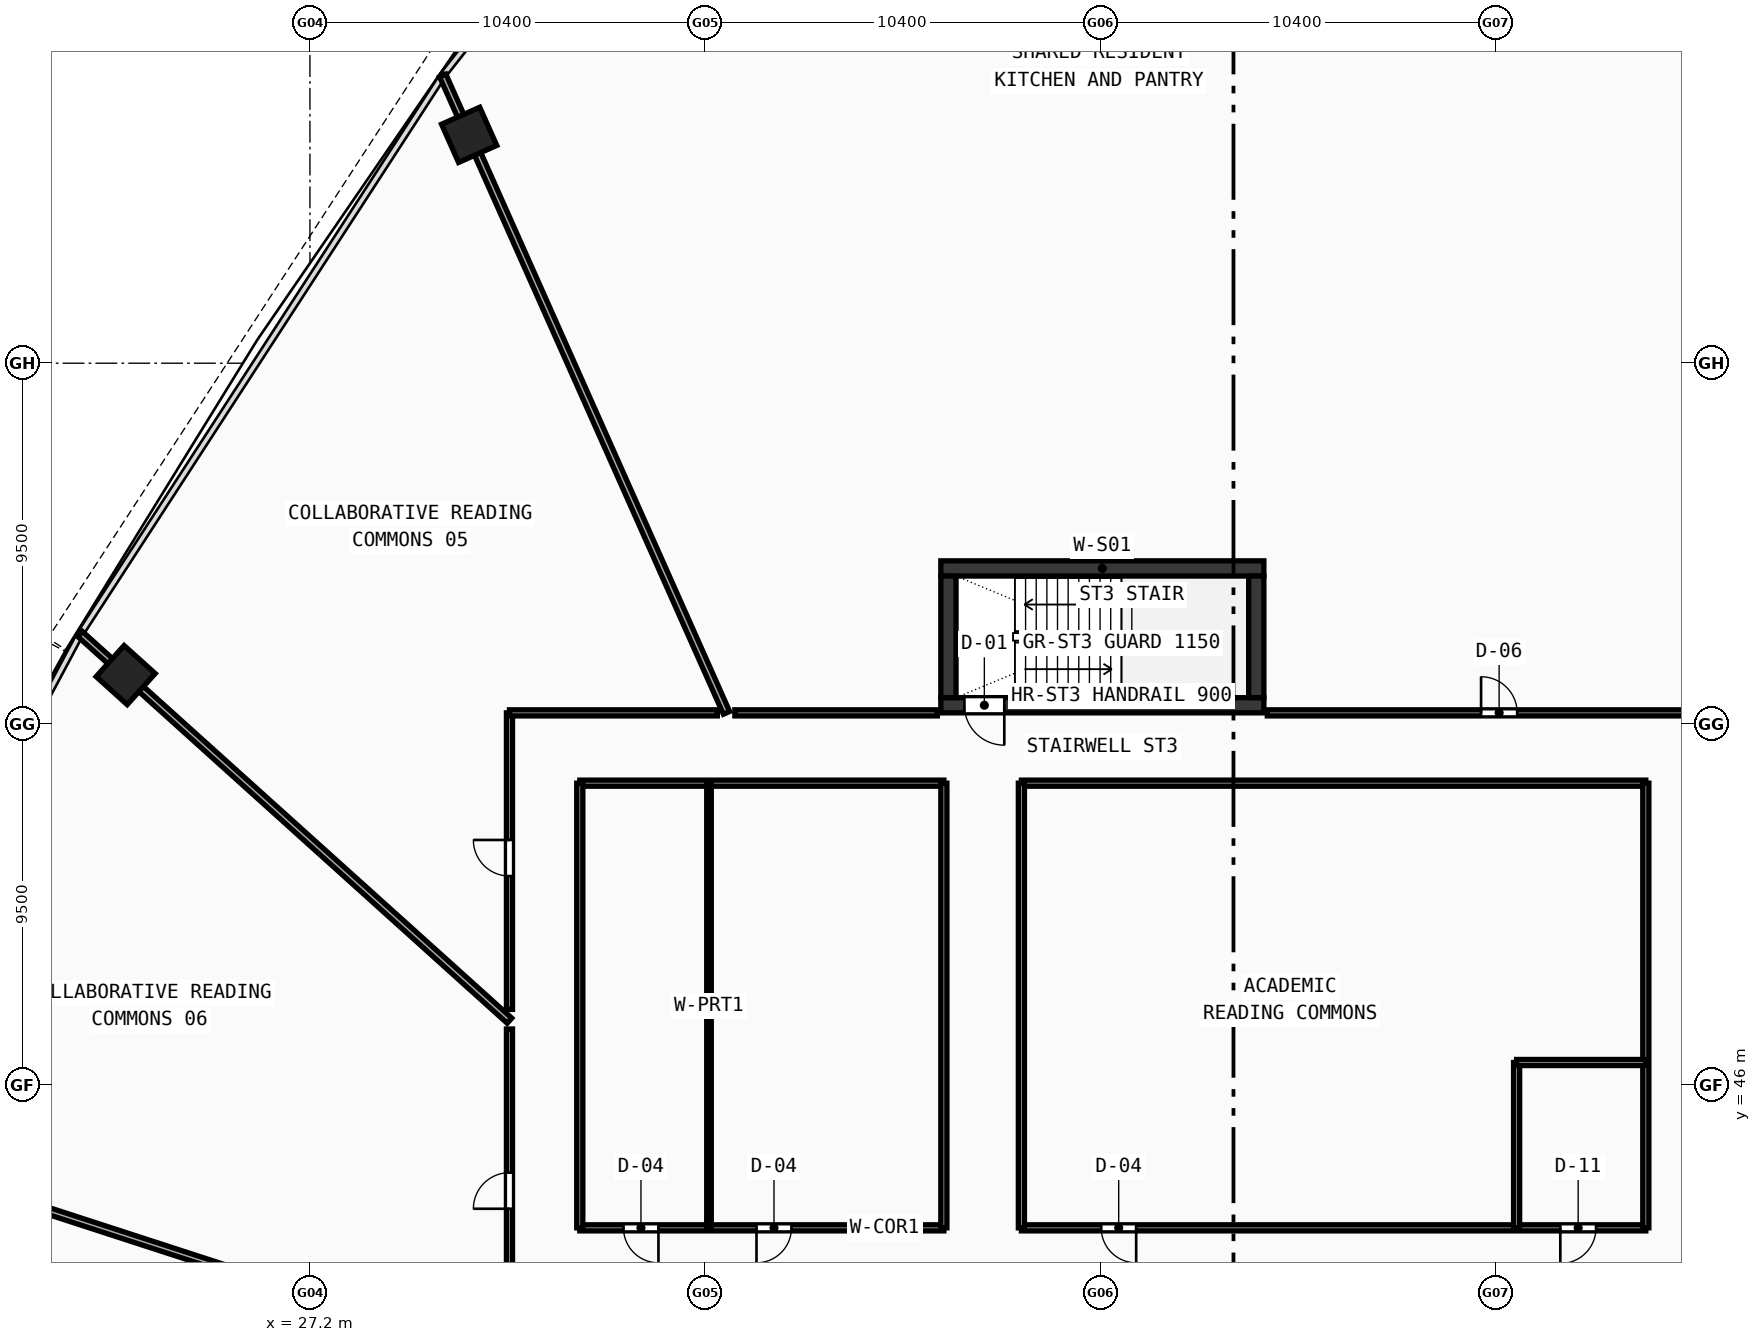
"""IFC4 building model, lengths in metres.
Left out: names, types, materials, properties, quantities, classifications, styles, units other than length and angle.
Written with IfcOpenShell. Run it as: python <this file> out.ifc"""

import sys

from ifc_helpers import new_model, si_unit, direction, frame, frame_2d, origin, origin_with_axes, origin_2d, place, context, subcontext, project, spatial, rectangle, hollow_rectangle, extrude, source, transform, mapped, element, fill, save


model = new_model("IFC4")
c1 = context("Model", 3, precision=1e-05, world=origin(), true_north=direction((0.0, 1.0)))
c2 = subcontext(c1, "Body", "Model", "MODEL_VIEW")
j1 = project(units=[si_unit("LENGTHUNIT", "METRE"), si_unit("PLANEANGLEUNIT", "RADIAN")], contexts=[c1])
p1 = place(None, origin())
s1 = spatial("IfcSite", under=j1, at=p1, CompositionType="ELEMENT")
p2 = place(p1, origin())
s2 = spatial("IfcBuilding", under=s1, at=p2, CompositionType="ELEMENT")
p3 = place(p2, frame((0.0, 0.0, 48.55)))
s3 = spatial("IfcBuildingStorey", under=s2, at=p3, CompositionType="ELEMENT", Elevation=48.55)
p4 = place(p3, frame((43.8, 59.6, 0.0), z_axis=(0.0, 0.0, 1.0), x_axis=(1.0, 0.0, 0.0)))
e1 = element("IfcWall", 1, at=p4, inside=s3, PredefinedType="SHEAR", context=c2, shape_type="SweptSolid", body=[
    extrude(rectangle(XDim=8.5, YDim=0.4, at=frame_2d((4.25, 0.0))), origin(), (0.0, 0.0, 1.0), 3.37),
])
p5 = place(p3, frame((43.8, 56.0, 0.0), z_axis=(0.0, 0.0, 1.0), x_axis=(1.0, 0.0, 0.0)))
e2 = element("IfcWall", 2, at=p5, inside=s3, PredefinedType="SHEAR", context=c2, shape_type="SweptSolid", body=[
    extrude(rectangle(XDim=8.5, YDim=0.4, at=frame_2d((4.25, 0.0))), origin(), (0.0, 0.0, 1.0), 3.37),
])
p6 = place(p5, frame((0.62, 0.0, 0.0)))
e3 = element("IfcOpeningElement", 3, at=p6, cuts=e2, PredefinedType="OPENING", context=c2, shape_type="SweptSolid", body=[
    extrude(rectangle(XDim=1.05, YDim=2.1, at=frame_2d((0.525, 1.05))), frame((0.0, 0.21, 0.0), z_axis=(0.0, -1.0, 0.0), x_axis=(1.0, 0.0, 0.0)), (0.0, 0.0, 1.0), 0.42),
])
for number, where, z_axis, x_axis in (
    (4, (44.0, 56.2, 0.0), (0.0, 0.0, 1.0), (0.0, 1.0, 0.0)),
    (5, (52.1, 56.2, 0.0), (0.0, 0.0, 1.0), (0.0, 1.0, 0.0)),
):
    element("IfcWall", number, at=place(p3, frame(where, z_axis=z_axis, x_axis=x_axis)), inside=s3, PredefinedType="SHEAR", context=c2, shape_type="SweptSolid", body=[
        extrude(rectangle(XDim=3.2, YDim=0.4, at=frame_2d((1.6, 0.0))), origin(), (0.0, 0.0, 1.0), 3.37),
    ])
m1 = source(origin(), c2, "Body", "SweptSolid", [
    extrude(hollow_rectangle(XDim=1.1, YDim=1.1, WallThickness=0.045, at=origin_2d()), origin(), (0.0, 0.0, 1.0), 3.63),
])
for number, where, z_axis, x_axis in (
    (6, (31.389, 71.009, -0.26), (0.0, 0.0, 1.0), (-0.914, -0.407, 0.0)),
    (7, (22.351, 56.794, -0.26), (0.0, 0.0, 1.0), (-0.669, -0.743, 0.0)),
):
    element("IfcColumn", number, at=place(p3, frame(where, z_axis=z_axis, x_axis=x_axis)), inside=s3, PredefinedType="COLUMN", context=c2, shape_type="MappedRepresentation", body=[
        mapped(m1, transform((0.0, 0.0, 0.0), scale=1.0)),
    ])
p7 = place(p3, frame((34.3, 42.25, 0.0), z_axis=(0.0, 0.0, 1.0), x_axis=(1.0, 0.0, 0.0)))
e8 = element("IfcWall", 8, at=p7, inside=s3, PredefinedType="PARTITIONING", context=c2, shape_type="SweptSolid", body=[
    extrude(rectangle(XDim=9.58, YDim=0.16, at=frame_2d((4.79, 0.0))), origin(), (0.0, 0.0, 1.0), 2.67),
])
p8 = place(p7, frame((1.15, 0.0, 0.0)))
e9 = element("IfcOpeningElement", 9, at=p8, cuts=e8, PredefinedType="OPENING", context=c2, shape_type="SweptSolid", body=[
    extrude(rectangle(XDim=0.92, YDim=2.1, at=frame_2d((0.46, 1.05))), frame((0.0, 0.09, 0.0), z_axis=(0.0, -1.0, 0.0), x_axis=(1.0, 0.0, 0.0)), (0.0, 0.0, 1.0), 0.18),
])
p9 = place(p7, frame((4.65, 0.0, 0.0)))
e10 = element("IfcOpeningElement", 10, at=p9, cuts=e8, PredefinedType="OPENING", context=c2, shape_type="SweptSolid", body=[
    extrude(rectangle(XDim=0.92, YDim=2.1, at=frame_2d((0.46, 1.05))), frame((0.0, 0.09, 0.0), z_axis=(0.0, -1.0, 0.0), x_axis=(1.0, 0.0, 0.0)), (0.0, 0.0, 1.0), 0.18),
])
p10 = place(p3, frame((34.3, 53.95, 0.0), z_axis=(0.0, 0.0, 1.0), x_axis=(1.0, 0.0, 0.0)))
e11 = element("IfcWall", 11, at=p10, inside=s3, PredefinedType="PARTITIONING", context=c2, shape_type="SweptSolid", body=[
    extrude(rectangle(XDim=9.58, YDim=0.16, at=frame_2d((4.79, 0.0))), origin(), (0.0, 0.0, 1.0), 2.67),
])
for number, where, z_axis, x_axis in (
    (12, (34.3, 42.25, 0.0), (0.0, 0.0, 1.0), (0.0, 1.0, 0.0)),
    (13, (43.88, 42.25, 0.0), (0.0, 0.0, 1.0), (0.0, 1.0, 0.0)),
):
    element("IfcWall", number, at=place(p3, frame(where, z_axis=z_axis, x_axis=x_axis)), inside=s3, PredefinedType="PARTITIONING", context=c2, shape_type="SweptSolid", body=[
        extrude(rectangle(XDim=11.7, YDim=0.16, at=frame_2d((5.85, 0.0))), origin(), (0.0, 0.0, 1.0), 2.67),
    ])
p11 = place(p3, frame((37.7, 42.25, 0.0), z_axis=(0.0, 0.0, 1.0), x_axis=(0.0, 1.0, 0.0)))
e14 = element("IfcWall", 14, at=p11, inside=s3, PredefinedType="PARTITIONING", context=c2, shape_type="SweptSolid", body=[
    extrude(rectangle(XDim=11.7, YDim=0.12, at=frame_2d((5.85, 0.0))), origin(), (0.0, 0.0, 1.0), 2.67),
])
p12 = place(p3, frame((45.92, 42.25, 0.0), z_axis=(0.0, 0.0, 1.0), x_axis=(1.0, 0.0, 0.0)))
e15 = element("IfcWall", 15, at=p12, inside=s3, PredefinedType="PARTITIONING", context=c2, shape_type="SweptSolid", body=[
    extrude(rectangle(XDim=16.43, YDim=0.16, at=frame_2d((8.215, 0.0))), origin(), (0.0, 0.0, 1.0), 2.67),
])
p13 = place(p12, frame((2.1, 0.0, 0.0)))
e16 = element("IfcOpeningElement", 16, at=p13, cuts=e15, PredefinedType="OPENING", context=c2, shape_type="SweptSolid", body=[
    extrude(rectangle(XDim=0.92, YDim=2.1, at=frame_2d((0.46, 1.05))), frame((0.0, 0.09, 0.0), z_axis=(0.0, -1.0, 0.0), x_axis=(1.0, 0.0, 0.0)), (0.0, 0.0, 1.0), 0.18),
])
p14 = place(p12, frame((14.18, 0.0, 0.0)))
e17 = element("IfcOpeningElement", 17, at=p14, cuts=e15, PredefinedType="OPENING", context=c2, shape_type="SweptSolid", body=[
    extrude(rectangle(XDim=0.94, YDim=2.1, at=frame_2d((0.47, 1.05))), frame((0.0, 0.09, 0.0), z_axis=(0.0, -1.0, 0.0), x_axis=(1.0, 0.0, 0.0)), (0.0, 0.0, 1.0), 0.18),
])
p15 = place(p3, frame((45.92, 53.95, 0.0), z_axis=(0.0, 0.0, 1.0), x_axis=(1.0, 0.0, 0.0)))
e18 = element("IfcWall", 18, at=p15, inside=s3, PredefinedType="PARTITIONING", context=c2, shape_type="SweptSolid", body=[
    extrude(rectangle(XDim=16.43, YDim=0.16, at=frame_2d((8.215, 0.0))), origin(), (0.0, 0.0, 1.0), 2.67),
])
p16 = place(p3, frame((45.92, 42.25, 0.0), z_axis=(0.0, 0.0, 1.0), x_axis=(0.0, 1.0, 0.0)))
e19 = element("IfcWall", 19, at=p16, inside=s3, PredefinedType="PARTITIONING", context=c2, shape_type="SweptSolid", body=[
    extrude(rectangle(XDim=11.7, YDim=0.16, at=frame_2d((5.85, 0.0))), origin(), (0.0, 0.0, 1.0), 2.97),
])
p17 = place(p3, frame((62.35, 42.25, 0.0), z_axis=(0.0, 0.0, 1.0), x_axis=(0.0, 1.0, 0.0)))
e20 = element("IfcWall", 20, at=p17, inside=s3, PredefinedType="PARTITIONING", context=c2, shape_type="SweptSolid", body=[
    extrude(rectangle(XDim=11.7, YDim=0.16, at=frame_2d((5.85, 0.0))), origin(), (0.0, 0.0, 1.0), 2.67),
])
p18 = place(p3, frame((58.95, 42.25, 0.0), z_axis=(0.0, 0.0, 1.0), x_axis=(0.0, 1.0, 0.0)))
e21 = element("IfcWall", 21, at=p18, inside=s3, PredefinedType="PARTITIONING", context=c2, shape_type="SweptSolid", body=[
    extrude(rectangle(XDim=4.35, YDim=0.16, at=frame_2d((2.175, 0.0))), origin(), (0.0, 0.0, 1.0), 2.67),
])
p19 = place(p3, frame((58.95, 46.6, 0.0), z_axis=(0.0, 0.0, 1.0), x_axis=(1.0, 0.0, 0.0)))
e22 = element("IfcWall", 22, at=p19, inside=s3, PredefinedType="PARTITIONING", context=c2, shape_type="SweptSolid", body=[
    extrude(rectangle(XDim=3.4, YDim=0.16, at=frame_2d((1.7, 0.0))), origin(), (0.0, 0.0, 1.0), 2.67),
])
p20 = place(p3, frame((38.16, 55.8, 0.0), z_axis=(0.0, 0.0, 1.0), x_axis=(-0.406730734994, 0.913548088067, 0.0)))
e23 = element("IfcWall", 23, at=p20, inside=s3, PredefinedType="PARTITIONING", context=c2, shape_type="SweptSolid", body=[
    extrude(rectangle(XDim=18.356, YDim=0.18, at=frame_2d((9.178, 0.0))), origin(), (0.0, 0.0, 1.0), 2.67),
])
p21 = place(p3, frame((32.45, 47.701, 0.0), z_axis=(0.0, 0.0, 1.0), x_axis=(-0.743155181141, 0.66911910505, 0.0)))
e24 = element("IfcWall", 24, at=p21, inside=s3, PredefinedType="PARTITIONING", context=c2, shape_type="SweptSolid", body=[
    extrude(rectangle(XDim=15.202, YDim=0.18, at=frame_2d((7.601, 0.0))), origin(), (0.0, 0.0, 1.0), 2.67),
])
p22 = place(p3, frame((32.45, 38.752, 0.0), z_axis=(0.0, 0.0, 1.0), x_axis=(-0.951055021268, 0.309021595557, 0.0)))
e25 = element("IfcWall", 25, at=p22, inside=s3, PredefinedType="PARTITIONING", context=c2, shape_type="SweptSolid", body=[
    extrude(rectangle(XDim=19.264, YDim=0.18, at=frame_2d((9.632, 0.0))), origin(), (0.0, 0.0, 1.0), 2.67),
])
p23 = place(p3, frame((32.45, 38.984, 0.0), z_axis=(0.0, 0.0, 1.0), x_axis=(0.0, 1.0, 0.0)))
e26 = element("IfcWall", 26, at=p23, inside=s3, PredefinedType="PARTITIONING", context=c2, shape_type="SweptSolid", body=[
    extrude(rectangle(XDim=8.498, YDim=0.16, at=frame_2d((4.249, 0.0))), origin(), (0.0, 0.0, 1.0), 2.67),
])
p24 = place(p23, frame((3.768, 0.0, 0.0)))
e27 = element("IfcOpeningElement", 27, at=p24, cuts=e26, PredefinedType="OPENING", context=c2, shape_type="SweptSolid", body=[
    extrude(rectangle(XDim=0.95, YDim=2.1, at=frame_2d((0.475, 1.05))), frame((0.0, 0.09, 0.0), z_axis=(0.0, -1.0, 0.0), x_axis=(1.0, 0.0, 0.0)), (0.0, 0.0, 1.0), 0.18),
])
p25 = place(p3, frame((32.45, 47.997, 0.0), z_axis=(0.0, 0.0, 1.0), x_axis=(0.0, 1.0, 0.0)))
e28 = element("IfcWall", 28, at=p25, inside=s3, PredefinedType="PARTITIONING", context=c2, shape_type="SweptSolid", body=[
    extrude(rectangle(XDim=7.803, YDim=0.16, at=frame_2d((3.901, 0.0))), origin(), (0.0, 0.0, 1.0), 3.37),
])
p26 = place(p25, frame((3.508, 0.0, 0.0)))
e29 = element("IfcOpeningElement", 29, at=p26, cuts=e28, PredefinedType="OPENING", context=c2, shape_type="SweptSolid", body=[
    extrude(rectangle(XDim=0.95, YDim=2.1, at=frame_2d((0.475, 1.05))), frame((0.0, 0.09, 0.0), z_axis=(0.0, -1.0, 0.0), x_axis=(1.0, 0.0, 0.0)), (0.0, 0.0, 1.0), 0.18),
])
p27 = place(p3, frame((32.45, 55.8, 0.0), z_axis=(0.0, 0.0, 1.0), x_axis=(1.0, 0.0, 0.0)))
e30 = element("IfcWall", 30, at=p27, inside=s3, PredefinedType="PARTITIONING", context=c2, shape_type="SweptSolid", body=[
    extrude(rectangle(XDim=5.47, YDim=0.16, at=frame_2d((2.735, 0.0))), origin(), (0.0, 0.0, 1.0), 3.37),
])
p28 = place(p3, frame((38.38, 55.8, 0.0), z_axis=(0.0, 0.0, 1.0), x_axis=(1.0, 0.0, 0.0)))
e31 = element("IfcWall", 31, at=p28, inside=s3, PredefinedType="PARTITIONING", context=c2, shape_type="SweptSolid", body=[
    extrude(rectangle(XDim=5.329, YDim=0.16, at=frame_2d((2.665, 0.0))), origin(), (0.0, 0.0, 1.0), 2.67),
])
p29 = place(p3, frame((52.391, 55.8, 0.0), z_axis=(0.0, 0.0, 1.0), x_axis=(1.0, 0.0, 0.0)))
e32 = element("IfcWall", 32, at=p29, inside=s3, PredefinedType="PARTITIONING", context=c2, shape_type="SweptSolid", body=[
    extrude(rectangle(XDim=11.809, YDim=0.16, at=frame_2d((5.904, 0.0))), origin(), (0.0, 0.0, 1.0), 2.67),
])
p30 = place(p29, frame((5.624, 0.0, 0.0)))
e33 = element("IfcOpeningElement", 33, at=p30, cuts=e32, PredefinedType="OPENING", context=c2, shape_type="SweptSolid", body=[
    extrude(rectangle(XDim=0.95, YDim=2.1, at=frame_2d((0.475, 1.05))), frame((0.0, 0.09, 0.0), z_axis=(0.0, -1.0, 0.0), x_axis=(1.0, 0.0, 0.0)), (0.0, 0.0, 1.0), 0.18),
])
m2 = source(origin(), c2, "Body", "SweptSolid", [
    extrude(rectangle(XDim=1.05, YDim=2.1, at=frame_2d((0.525, 1.05))), frame((0.0, 0.025, 0.0), z_axis=(0.0, -1.0, 0.0), x_axis=(1.0, 0.0, 0.0)), (0.0, 0.0, 1.0), 0.05),
])
p31 = place(p6, frame((1.05, 0.0, 0.0), z_axis=(0.0, 0.0, 1.0), x_axis=(-1.0, 0.0, 0.0)))
e34 = element("IfcDoor", 34, at=p31, inside=s3, OperationType="SINGLE_SWING_LEFT", PredefinedType="DOOR", context=c2, shape_type="MappedRepresentation", body=[
    mapped(m2, transform((0.0, 0.0, 0.0), scale=1.0)),
])
fill(e3, e34)
m3 = source(origin(), c2, "Body", "SweptSolid", [
    extrude(rectangle(XDim=0.92, YDim=2.1, at=frame_2d((0.46, 1.05))), frame((0.0, 0.025, 0.0), z_axis=(0.0, -1.0, 0.0), x_axis=(1.0, 0.0, 0.0)), (0.0, 0.0, 1.0), 0.05),
])
p32 = place(p8, frame((0.92, 0.0, 0.0), z_axis=(0.0, 0.0, 1.0), x_axis=(-1.0, 0.0, 0.0)))
e35 = element("IfcDoor", 35, at=p32, inside=s3, OperationType="SINGLE_SWING_LEFT", PredefinedType="DOOR", context=c2, shape_type="MappedRepresentation", body=[
    mapped(m3, transform((0.0, 0.0, 0.0), scale=1.0)),
])
fill(e9, e35)
p33 = place(p9, frame((0.92, 0.0, 0.0), z_axis=(0.0, 0.0, 1.0), x_axis=(-1.0, 0.0, 0.0)))
e36 = element("IfcDoor", 36, at=p33, inside=s3, OperationType="SINGLE_SWING_RIGHT", PredefinedType="DOOR", context=c2, shape_type="MappedRepresentation", body=[
    mapped(m3, transform((0.0, 0.0, 0.0), scale=1.0)),
])
fill(e10, e36)
p34 = place(p13, frame((0.92, 0.0, 0.0), z_axis=(0.0, 0.0, 1.0), x_axis=(-1.0, 0.0, 0.0)))
e37 = element("IfcDoor", 37, at=p34, inside=s3, OperationType="SINGLE_SWING_LEFT", PredefinedType="DOOR", context=c2, shape_type="MappedRepresentation", body=[
    mapped(m3, transform((0.0, 0.0, 0.0), scale=1.0)),
])
fill(e16, e37)
m4 = source(origin(), c2, "Body", "SweptSolid", [
    extrude(rectangle(XDim=0.94, YDim=2.1, at=frame_2d((0.47, 1.05))), frame((0.0, 0.025, 0.0), z_axis=(0.0, -1.0, 0.0), x_axis=(1.0, 0.0, 0.0)), (0.0, 0.0, 1.0), 0.05),
])
p35 = place(p14, frame((0.94, 0.0, 0.0), z_axis=(0.0, 0.0, 1.0), x_axis=(-1.0, 0.0, 0.0)))
e38 = element("IfcDoor", 38, at=p35, inside=s3, OperationType="SINGLE_SWING_RIGHT", PredefinedType="DOOR", context=c2, shape_type="MappedRepresentation", body=[
    mapped(m4, transform((0.0, 0.0, 0.0), scale=1.0)),
])
fill(e17, e38)
m5 = source(origin(), c2, "Body", "SweptSolid", [
    extrude(rectangle(XDim=0.95, YDim=2.1, at=frame_2d((0.475, 1.05))), frame((0.0, 0.025, 0.0), z_axis=(0.0, -1.0, 0.0), x_axis=(1.0, 0.0, 0.0)), (0.0, 0.0, 1.0), 0.05),
])
p36 = place(p30, origin_with_axes())
e39 = element("IfcDoor", 39, at=p36, inside=s3, OperationType="SINGLE_SWING_LEFT", PredefinedType="DOOR", context=c2, shape_type="MappedRepresentation", body=[
    mapped(m5, transform((0.0, 0.0, 0.0), scale=1.0)),
])
fill(e33, e39)
p37 = place(p26, origin_with_axes())
e40 = element("IfcDoor", 40, at=p37, inside=s3, OperationType="SINGLE_SWING_RIGHT", PredefinedType="DOOR", context=c2, shape_type="MappedRepresentation", body=[
    mapped(m5, transform((0.0, 0.0, 0.0), scale=1.0)),
])
fill(e29, e40)
p38 = place(p24, origin_with_axes())
e41 = element("IfcDoor", 41, at=p38, inside=s3, OperationType="SINGLE_SWING_LEFT", PredefinedType="DOOR", context=c2, shape_type="MappedRepresentation", body=[
    mapped(m5, transform((0.0, 0.0, 0.0), scale=1.0)),
])
fill(e27, e41)
save(model, sys.argv[1])
